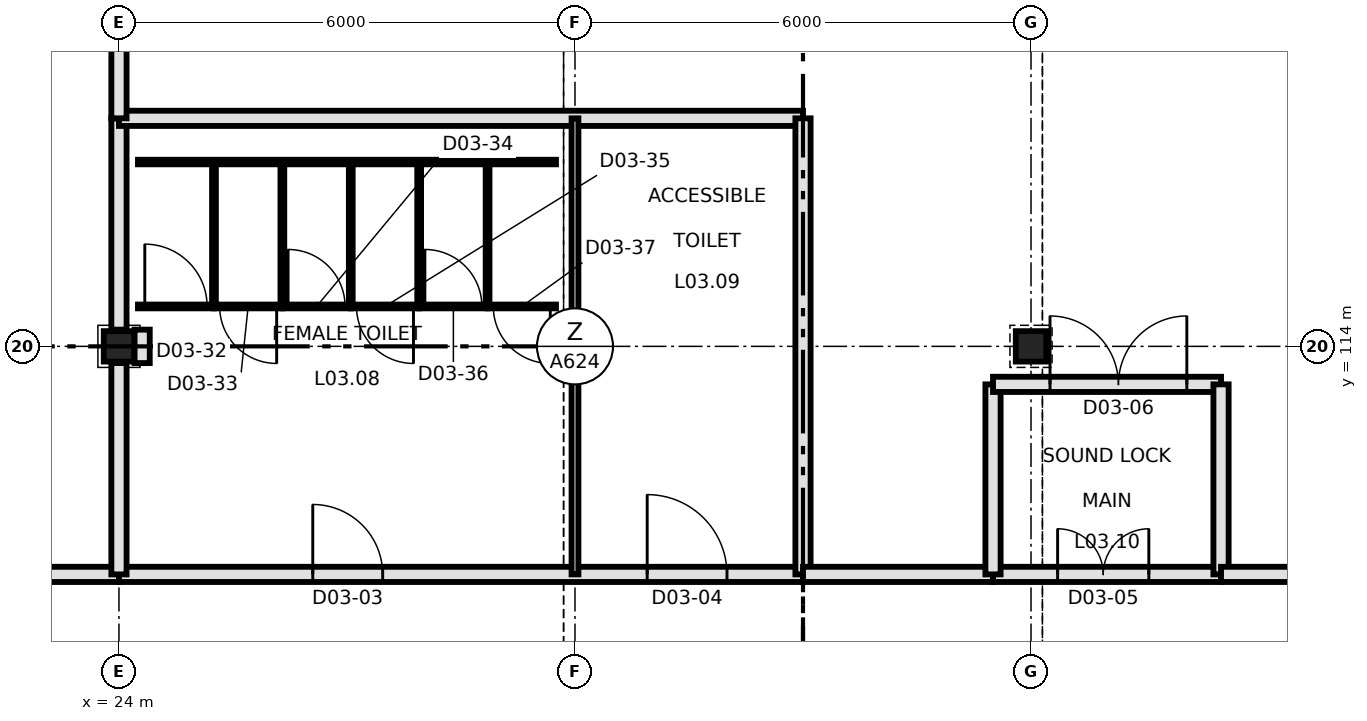
"""IFC4 building model, lengths in metres.
Left out: names, types, materials, properties, quantities, classifications, styles, units other than length and angle.
Written with IfcOpenShell. Run it as: python <this file> out.ifc"""

import sys

from ifc_helpers import new_model, si_unit, direction, frame, frame_2d, origin, origin_2d, place, context, subcontext, project, spatial, rectangle, extrude, element, fill, save


model = new_model("IFC4")
c1 = context("Model", 3, precision=1e-05, world=origin(), true_north=direction((0.0, 1.0)))
c2 = subcontext(c1, "Body", "Model", "MODEL_VIEW")
j1 = project(units=[si_unit("LENGTHUNIT", "METRE"), si_unit("PLANEANGLEUNIT", "RADIAN")], contexts=[c1])
p1 = place(None, origin())
s1 = spatial("IfcSite", under=j1, at=p1, CompositionType="ELEMENT")
p2 = place(p1, origin())
s2 = spatial("IfcBuilding", under=s1, at=p2, CompositionType="ELEMENT")
p3 = place(p2, frame((0.0, 0.0, 16.5)))
s3 = spatial("IfcBuildingStorey", under=s2, at=p3, CompositionType="ELEMENT", Elevation=16.5)
for number, where, z_axis, x_axis in (
    (1, (24.0, 114.0, 0.0), (0.0, 0.0, 1.0), (1.0, 0.0, 0.0)),
    (2, (30.0, 114.0, 0.0), (0.0, 0.0, 1.0), (1.0, 0.0, 0.0)),
    (3, (36.0, 114.0, 0.0), (0.0, 0.0, 1.0), (1.0, 0.0, 0.0)),
):
    element("IfcColumn", number, at=place(p3, frame(where, z_axis=z_axis, x_axis=x_axis)), inside=s3, PredefinedType="COLUMN", context=c2, shape_type="SweptSolid", body=[
        extrude(rectangle(XDim=0.4, YDim=0.4, at=origin_2d()), origin(), (0.0, 0.0, 1.0), 11.5),
    ])
p4 = place(p3, frame((19.5, 111.0, 0.0), z_axis=(0.0, 0.0, 1.0), x_axis=(1.0, 0.0, 0.0)))
e4 = element("IfcWall", 4, at=p4, inside=s3, PredefinedType="PARTITIONING", context=c2, shape_type="SweptSolid", body=[
    extrude(rectangle(XDim=4.5, YDim=0.2, at=frame_2d((2.25, 0.0))), origin(), (0.0, 0.0, 1.0), 6.28),
])
p5 = place(p3, frame((24.0, 111.0, 0.0), z_axis=(0.0, 0.0, 1.0), x_axis=(1.0, 0.0, 0.0)))
e5 = element("IfcWall", 5, at=p5, inside=s3, PredefinedType="PARTITIONING", context=c2, shape_type="SweptSolid", body=[
    extrude(rectangle(XDim=9.0, YDim=0.2, at=frame_2d((4.5, 0.0))), origin(), (0.0, 0.0, 1.0), 6.28),
])
p6 = place(p5, frame((2.55, 0.0, 0.0)))
e6 = element("IfcOpeningElement", 6, at=p6, cuts=e5, PredefinedType="OPENING", context=c2, shape_type="SweptSolid", body=[
    extrude(rectangle(XDim=0.92, YDim=2.04, at=frame_2d((0.46, 1.02))), frame((0.0, 0.11, 0.0), z_axis=(0.0, -1.0, 0.0), x_axis=(1.0, 0.0, 0.0)), (0.0, 0.0, 1.0), 0.22),
])
p7 = place(p5, frame((6.95, 0.0, 0.0)))
e7 = element("IfcOpeningElement", 7, at=p7, cuts=e5, PredefinedType="OPENING", context=c2, shape_type="SweptSolid", body=[
    extrude(rectangle(XDim=1.05, YDim=2.1, at=frame_2d((0.525, 1.05))), frame((0.0, 0.11, 0.0), z_axis=(0.0, -1.0, 0.0), x_axis=(1.0, 0.0, 0.0)), (0.0, 0.0, 1.0), 0.22),
])
for number, where, z_axis, x_axis in (
    (8, (24.0, 114.22, 0.0), (0.0, 0.0, 1.0), (0.0, 1.0, 0.0)),
    (9, (24.0, 111.0, 0.0), (0.0, 0.0, 1.0), (0.0, 1.0, 0.0)),
):
    element("IfcWall", number, at=place(p3, frame(where, z_axis=z_axis, x_axis=x_axis)), inside=s3, PredefinedType="PARTITIONING", context=c2, shape_type="SweptSolid", body=[
        extrude(rectangle(XDim=2.78, YDim=0.2, at=frame_2d((1.39, 0.0))), origin(), (0.0, 0.0, 1.0), 6.28),
    ])
p8 = place(p3, frame((24.305, 113.78, 0.0), z_axis=(0.0, 0.0, 1.0), x_axis=(0.0, 1.0, 0.0)))
e10 = element("IfcWall", 10, at=p8, inside=s3, PredefinedType="PARTITIONING", context=c2, shape_type="SweptSolid", body=[
    extrude(rectangle(XDim=0.44, YDim=0.2, at=frame_2d((0.22, 0.0))), origin(), (0.0, 0.0, 1.0), 6.28),
])
p9 = place(p3, frame((24.0, 117.0, 0.0), z_axis=(0.0, 0.0, 1.0), x_axis=(1.0, 0.0, 0.0)))
e11 = element("IfcWall", 11, at=p9, inside=s3, PredefinedType="PARTITIONING", context=c2, shape_type="SweptSolid", body=[
    extrude(rectangle(XDim=9.0, YDim=0.2, at=frame_2d((4.5, 0.0))), origin(), (0.0, 0.0, 1.0), 6.28),
])
p10 = place(p3, frame((33.0, 111.0, 0.0), z_axis=(0.0, 0.0, 1.0), x_axis=(0.0, 1.0, 0.0)))
e12 = element("IfcWall", 12, at=p10, inside=s3, PredefinedType="PARTITIONING", context=c2, shape_type="SweptSolid", body=[
    extrude(rectangle(XDim=6.0, YDim=0.2, at=frame_2d((3.0, 0.0))), origin(), (0.0, 0.0, 1.0), 6.28),
])
p11 = place(p3, frame((24.0, 117.0, 0.0), z_axis=(0.0, 0.0, 1.0), x_axis=(0.0, 1.0, 0.0)))
e13 = element("IfcWall", 13, at=p11, inside=s3, PredefinedType="PARTITIONING", context=c2, shape_type="SweptSolid", body=[
    extrude(rectangle(XDim=8.504, YDim=0.2, at=frame_2d((4.252, 0.0))), origin(), (0.0, 0.0, 1.0), 6.28),
])
p12 = place(p3, frame((33.0, 111.0, 0.0), z_axis=(0.0, 0.0, 1.0), x_axis=(1.0, 0.0, 0.0)))
e14 = element("IfcWall", 14, at=p12, inside=s3, PredefinedType="PARTITIONING", context=c2, shape_type="SweptSolid", body=[
    extrude(rectangle(XDim=2.5, YDim=0.2, at=frame_2d((1.25, 0.0))), origin(), (0.0, 0.0, 1.0), 6.28),
])
p13 = place(p3, frame((35.5, 111.0, 0.0), z_axis=(0.0, 0.0, 1.0), x_axis=(1.0, 0.0, 0.0)))
e15 = element("IfcWall", 15, at=p13, inside=s3, PredefinedType="PARTITIONING", context=c2, shape_type="SweptSolid", body=[
    extrude(rectangle(XDim=3.0, YDim=0.2, at=frame_2d((1.5, 0.0))), origin(), (0.0, 0.0, 1.0), 6.28),
])
p14 = place(p13, frame((0.85, 0.0, 0.0)))
e16 = element("IfcOpeningElement", 16, at=p14, cuts=e15, PredefinedType="OPENING", context=c2, shape_type="SweptSolid", body=[
    extrude(rectangle(XDim=1.2, YDim=2.1, at=frame_2d((0.6, 1.05))), frame((0.0, 0.11, 0.0), z_axis=(0.0, -1.0, 0.0), x_axis=(1.0, 0.0, 0.0)), (0.0, 0.0, 1.0), 0.22),
])
p15 = place(p3, frame((35.5, 111.0, 0.0), z_axis=(0.0, 0.0, 1.0), x_axis=(0.0, 1.0, 0.0)))
e17 = element("IfcWall", 17, at=p15, inside=s3, PredefinedType="PARTITIONING", context=c2, shape_type="SweptSolid", body=[
    extrude(rectangle(XDim=2.5, YDim=0.2, at=frame_2d((1.25, 0.0))), origin(), (0.0, 0.0, 1.0), 6.28),
])
p16 = place(p3, frame((35.5, 113.5, 0.0), z_axis=(0.0, 0.0, 1.0), x_axis=(1.0, 0.0, 0.0)))
e18 = element("IfcWall", 18, at=p16, inside=s3, PredefinedType="PARTITIONING", context=c2, shape_type="SweptSolid", body=[
    extrude(rectangle(XDim=3.0, YDim=0.2, at=frame_2d((1.5, 0.0))), origin(), (0.0, 0.0, 1.0), 6.28),
])
p17 = place(p16, frame((0.75, 0.0, 0.0)))
e19 = element("IfcOpeningElement", 19, at=p17, cuts=e18, PredefinedType="OPENING", context=c2, shape_type="SweptSolid", body=[
    extrude(rectangle(XDim=1.8, YDim=2.1, at=frame_2d((0.9, 1.05))), frame((0.0, 0.11, 0.0), z_axis=(0.0, -1.0, 0.0), x_axis=(1.0, 0.0, 0.0)), (0.0, 0.0, 1.0), 0.22),
])
p18 = place(p3, frame((38.5, 111.0, 0.0), z_axis=(0.0, 0.0, 1.0), x_axis=(0.0, 1.0, 0.0)))
e20 = element("IfcWall", 20, at=p18, inside=s3, PredefinedType="PARTITIONING", context=c2, shape_type="SweptSolid", body=[
    extrude(rectangle(XDim=2.5, YDim=0.2, at=frame_2d((1.25, 0.0))), origin(), (0.0, 0.0, 1.0), 6.28),
])
p19 = place(p3, frame((38.5, 111.0, 0.0), z_axis=(0.0, 0.0, 1.0), x_axis=(1.0, 0.0, 0.0)))
e21 = element("IfcWall", 21, at=p19, inside=s3, PredefinedType="PARTITIONING", context=c2, shape_type="SweptSolid", body=[
    extrude(rectangle(XDim=3.5, YDim=0.2, at=frame_2d((1.75, 0.0))), origin(), (0.0, 0.0, 1.0), 6.28),
])
for number, where, z_axis, x_axis in (
    (22, (30.0, 114.22, 0.0), (0.0, 0.0, 1.0), (0.0, 1.0, 0.0)),
    (23, (30.0, 111.0, 0.0), (0.0, 0.0, 1.0), (0.0, 1.0, 0.0)),
):
    element("IfcWall", number, at=place(p3, frame(where, z_axis=z_axis, x_axis=x_axis)), inside=s3, PredefinedType="PARTITIONING", context=c2, shape_type="SweptSolid", body=[
        extrude(rectangle(XDim=2.78, YDim=0.09, at=frame_2d((1.39, 0.0))), origin(), (0.0, 0.0, 1.0), 6.28),
    ])
p20 = place(p3, frame((30.25, 113.78, 0.0), z_axis=(0.0, 0.0, 1.0), x_axis=(0.0, 1.0, 0.0)))
e24 = element("IfcWall", 24, at=p20, inside=s3, PredefinedType="PARTITIONING", context=c2, shape_type="SweptSolid", body=[
    extrude(rectangle(XDim=0.44, YDim=0.09, at=frame_2d((0.22, 0.0))), origin(), (0.0, 0.0, 1.0), 6.28),
])
p21 = place(p3, frame((24.25, 116.425, 0.0), z_axis=(0.0, 0.0, 1.0), x_axis=(1.0, 0.0, 0.0)))
e25 = element("IfcWall", 25, at=p21, inside=s3, PredefinedType="PARTITIONING", context=c2, shape_type="SweptSolid", body=[
    extrude(rectangle(XDim=5.5, YDim=0.06, at=frame_2d((2.75, 0.0))), origin(), (0.0, 0.0, 1.0), 2.1),
])
for number, where, z_axis, x_axis in (
    (26, (25.25, 114.525, 0.0), (0.0, 0.0, 1.0), (0.0, 1.0, 0.0)),
    (27, (26.15, 114.525, 0.0), (0.0, 0.0, 1.0), (0.0, 1.0, 0.0)),
    (28, (27.05, 114.525, 0.0), (0.0, 0.0, 1.0), (0.0, 1.0, 0.0)),
    (29, (27.95, 114.525, 0.0), (0.0, 0.0, 1.0), (0.0, 1.0, 0.0)),
    (30, (28.85, 114.525, 0.0), (0.0, 0.0, 1.0), (0.0, 1.0, 0.0)),
):
    element("IfcWall", number, at=place(p3, frame(where, z_axis=z_axis, x_axis=x_axis)), inside=s3, PredefinedType="PARTITIONING", context=c2, shape_type="SweptSolid", body=[
        extrude(rectangle(XDim=1.9, YDim=0.05, at=frame_2d((0.95, 0.0))), origin(), (0.0, 0.0, 1.0), 2.1),
    ])
p22 = place(p3, frame((24.25, 114.525, 0.0), z_axis=(0.0, 0.0, 1.0), x_axis=(1.0, 0.0, 0.0)))
e31 = element("IfcWall", 31, at=p22, inside=s3, PredefinedType="PARTITIONING", context=c2, shape_type="SweptSolid", body=[
    extrude(rectangle(XDim=1.0, YDim=0.05, at=frame_2d((0.5, 0.0))), origin(), (0.0, 0.0, 1.0), 2.1),
])
p23 = place(p22, frame((0.09, 0.0, 0.0)))
e32 = element("IfcOpeningElement", 32, at=p23, cuts=e31, PredefinedType="OPENING", context=c2, shape_type="SweptSolid", body=[
    extrude(rectangle(XDim=0.82, YDim=2.0, at=frame_2d((0.41, 1.0))), frame((0.0, 0.035, 0.0), z_axis=(0.0, -1.0, 0.0), x_axis=(1.0, 0.0, 0.0)), (0.0, 0.0, 1.0), 0.07),
])
p24 = place(p3, frame((25.25, 114.525, 0.0), z_axis=(0.0, 0.0, 1.0), x_axis=(1.0, 0.0, 0.0)))
e33 = element("IfcWall", 33, at=p24, inside=s3, PredefinedType="PARTITIONING", context=c2, shape_type="SweptSolid", body=[
    extrude(rectangle(XDim=0.9, YDim=0.05, at=frame_2d((0.45, 0.0))), origin(), (0.0, 0.0, 1.0), 2.1),
])
p25 = place(p24, frame((0.075, 0.0, 0.0)))
e34 = element("IfcOpeningElement", 34, at=p25, cuts=e33, PredefinedType="OPENING", context=c2, shape_type="SweptSolid", body=[
    extrude(rectangle(XDim=0.75, YDim=2.0, at=frame_2d((0.375, 1.0))), frame((0.0, 0.035, 0.0), z_axis=(0.0, -1.0, 0.0), x_axis=(1.0, 0.0, 0.0)), (0.0, 0.0, 1.0), 0.07),
])
p26 = place(p3, frame((26.15, 114.525, 0.0), z_axis=(0.0, 0.0, 1.0), x_axis=(1.0, 0.0, 0.0)))
e35 = element("IfcWall", 35, at=p26, inside=s3, PredefinedType="PARTITIONING", context=c2, shape_type="SweptSolid", body=[
    extrude(rectangle(XDim=0.9, YDim=0.05, at=frame_2d((0.45, 0.0))), origin(), (0.0, 0.0, 1.0), 2.1),
])
p27 = place(p26, frame((0.075, 0.0, 0.0)))
e36 = element("IfcOpeningElement", 36, at=p27, cuts=e35, PredefinedType="OPENING", context=c2, shape_type="SweptSolid", body=[
    extrude(rectangle(XDim=0.75, YDim=2.0, at=frame_2d((0.375, 1.0))), frame((0.0, 0.035, 0.0), z_axis=(0.0, -1.0, 0.0), x_axis=(1.0, 0.0, 0.0)), (0.0, 0.0, 1.0), 0.07),
])
p28 = place(p3, frame((27.05, 114.525, 0.0), z_axis=(0.0, 0.0, 1.0), x_axis=(1.0, 0.0, 0.0)))
e37 = element("IfcWall", 37, at=p28, inside=s3, PredefinedType="PARTITIONING", context=c2, shape_type="SweptSolid", body=[
    extrude(rectangle(XDim=0.9, YDim=0.05, at=frame_2d((0.45, 0.0))), origin(), (0.0, 0.0, 1.0), 2.1),
])
p29 = place(p28, frame((0.075, 0.0, 0.0)))
e38 = element("IfcOpeningElement", 38, at=p29, cuts=e37, PredefinedType="OPENING", context=c2, shape_type="SweptSolid", body=[
    extrude(rectangle(XDim=0.75, YDim=2.0, at=frame_2d((0.375, 1.0))), frame((0.0, 0.035, 0.0), z_axis=(0.0, -1.0, 0.0), x_axis=(1.0, 0.0, 0.0)), (0.0, 0.0, 1.0), 0.07),
])
p30 = place(p3, frame((27.95, 114.525, 0.0), z_axis=(0.0, 0.0, 1.0), x_axis=(1.0, 0.0, 0.0)))
e39 = element("IfcWall", 39, at=p30, inside=s3, PredefinedType="PARTITIONING", context=c2, shape_type="SweptSolid", body=[
    extrude(rectangle(XDim=0.9, YDim=0.05, at=frame_2d((0.45, 0.0))), origin(), (0.0, 0.0, 1.0), 2.1),
])
p31 = place(p30, frame((0.075, 0.0, 0.0)))
e40 = element("IfcOpeningElement", 40, at=p31, cuts=e39, PredefinedType="OPENING", context=c2, shape_type="SweptSolid", body=[
    extrude(rectangle(XDim=0.75, YDim=2.0, at=frame_2d((0.375, 1.0))), frame((0.0, 0.035, 0.0), z_axis=(0.0, -1.0, 0.0), x_axis=(1.0, 0.0, 0.0)), (0.0, 0.0, 1.0), 0.07),
])
p32 = place(p3, frame((28.85, 114.525, 0.0), z_axis=(0.0, 0.0, 1.0), x_axis=(1.0, 0.0, 0.0)))
e41 = element("IfcWall", 41, at=p32, inside=s3, PredefinedType="PARTITIONING", context=c2, shape_type="SweptSolid", body=[
    extrude(rectangle(XDim=0.9, YDim=0.05, at=frame_2d((0.45, 0.0))), origin(), (0.0, 0.0, 1.0), 2.1),
])
p33 = place(p32, frame((0.075, 0.0, 0.0)))
e42 = element("IfcOpeningElement", 42, at=p33, cuts=e41, PredefinedType="OPENING", context=c2, shape_type="SweptSolid", body=[
    extrude(rectangle(XDim=0.75, YDim=2.0, at=frame_2d((0.375, 1.0))), frame((0.0, 0.035, 0.0), z_axis=(0.0, -1.0, 0.0), x_axis=(1.0, 0.0, 0.0)), (0.0, 0.0, 1.0), 0.07),
])
p34 = place(p6, origin())
e43 = element("IfcDoor", 43, at=p34, inside=s3, OperationType="SINGLE_SWING_LEFT", PredefinedType="DOOR", context=c2, shape_type="SweptSolid", body=[
    extrude(rectangle(XDim=0.92, YDim=2.04, at=frame_2d((0.46, 1.02))), frame((0.0, 0.025, 0.0), z_axis=(0.0, -1.0, 0.0), x_axis=(1.0, 0.0, 0.0)), (0.0, 0.0, 1.0), 0.05),
])
fill(e6, e43)
p35 = place(p7, origin())
e44 = element("IfcDoor", 44, at=p35, inside=s3, OperationType="SINGLE_SWING_LEFT", PredefinedType="DOOR", context=c2, shape_type="SweptSolid", body=[
    extrude(rectangle(XDim=1.05, YDim=2.1, at=frame_2d((0.525, 1.05))), frame((0.0, 0.025, 0.0), z_axis=(0.0, -1.0, 0.0), x_axis=(1.0, 0.0, 0.0)), (0.0, 0.0, 1.0), 0.05),
])
fill(e7, e44)
p36 = place(p14, origin())
e45 = element("IfcDoor", 45, at=p36, inside=s3, OperationType="DOUBLE_DOOR_SINGLE_SWING", PredefinedType="DOOR", context=c2, shape_type="SweptSolid", body=[
    extrude(rectangle(XDim=1.2, YDim=2.1, at=frame_2d((0.6, 1.05))), frame((0.0, 0.025, 0.0), z_axis=(0.0, -1.0, 0.0), x_axis=(1.0, 0.0, 0.0)), (0.0, 0.0, 1.0), 0.05),
])
fill(e16, e45)
p37 = place(p17, frame((1.8, 0.0, 0.0), z_axis=(0.0, 0.0, 1.0), x_axis=(-1.0, 0.0, 0.0)))
e46 = element("IfcDoor", 46, at=p37, inside=s3, OperationType="DOUBLE_DOOR_SINGLE_SWING", PredefinedType="DOOR", context=c2, shape_type="SweptSolid", body=[
    extrude(rectangle(XDim=1.8, YDim=2.1, at=frame_2d((0.9, 1.05))), frame((0.0, 0.025, 0.0), z_axis=(0.0, -1.0, 0.0), x_axis=(1.0, 0.0, 0.0)), (0.0, 0.0, 1.0), 0.05),
])
fill(e19, e46)
p38 = place(p23, origin())
e47 = element("IfcDoor", 47, at=p38, inside=s3, OperationType="SINGLE_SWING_LEFT", PredefinedType="DOOR", context=c2, shape_type="SweptSolid", body=[
    extrude(rectangle(XDim=0.82, YDim=2.0, at=frame_2d((0.41, 1.0))), frame((0.0, 0.025, 0.0), z_axis=(0.0, -1.0, 0.0), x_axis=(1.0, 0.0, 0.0)), (0.0, 0.0, 1.0), 0.05),
])
fill(e32, e47)
p39 = place(p25, origin())
e48 = element("IfcDoor", 48, at=p39, inside=s3, OperationType="SINGLE_SWING_RIGHT", PredefinedType="DOOR", context=c2, shape_type="SweptSolid", body=[
    extrude(rectangle(XDim=0.75, YDim=2.0, at=frame_2d((0.375, 1.0))), frame((0.0, 0.025, 0.0), z_axis=(0.0, -1.0, 0.0), x_axis=(1.0, 0.0, 0.0)), (0.0, 0.0, 1.0), 0.05),
])
fill(e34, e48)
p40 = place(p27, origin())
e49 = element("IfcDoor", 49, at=p40, inside=s3, OperationType="SINGLE_SWING_LEFT", PredefinedType="DOOR", context=c2, shape_type="SweptSolid", body=[
    extrude(rectangle(XDim=0.75, YDim=2.0, at=frame_2d((0.375, 1.0))), frame((0.0, 0.025, 0.0), z_axis=(0.0, -1.0, 0.0), x_axis=(1.0, 0.0, 0.0)), (0.0, 0.0, 1.0), 0.05),
])
fill(e36, e49)
p41 = place(p29, origin())
e50 = element("IfcDoor", 50, at=p41, inside=s3, OperationType="SINGLE_SWING_RIGHT", PredefinedType="DOOR", context=c2, shape_type="SweptSolid", body=[
    extrude(rectangle(XDim=0.75, YDim=2.0, at=frame_2d((0.375, 1.0))), frame((0.0, 0.025, 0.0), z_axis=(0.0, -1.0, 0.0), x_axis=(1.0, 0.0, 0.0)), (0.0, 0.0, 1.0), 0.05),
])
fill(e38, e50)
p42 = place(p31, origin())
e51 = element("IfcDoor", 51, at=p42, inside=s3, OperationType="SINGLE_SWING_LEFT", PredefinedType="DOOR", context=c2, shape_type="SweptSolid", body=[
    extrude(rectangle(XDim=0.75, YDim=2.0, at=frame_2d((0.375, 1.0))), frame((0.0, 0.025, 0.0), z_axis=(0.0, -1.0, 0.0), x_axis=(1.0, 0.0, 0.0)), (0.0, 0.0, 1.0), 0.05),
])
fill(e40, e51)
p43 = place(p33, origin())
e52 = element("IfcDoor", 52, at=p43, inside=s3, OperationType="SINGLE_SWING_RIGHT", PredefinedType="DOOR", context=c2, shape_type="SweptSolid", body=[
    extrude(rectangle(XDim=0.75, YDim=2.0, at=frame_2d((0.375, 1.0))), frame((0.0, 0.025, 0.0), z_axis=(0.0, -1.0, 0.0), x_axis=(1.0, 0.0, 0.0)), (0.0, 0.0, 1.0), 0.05),
])
fill(e42, e52)
save(model, sys.argv[1])
